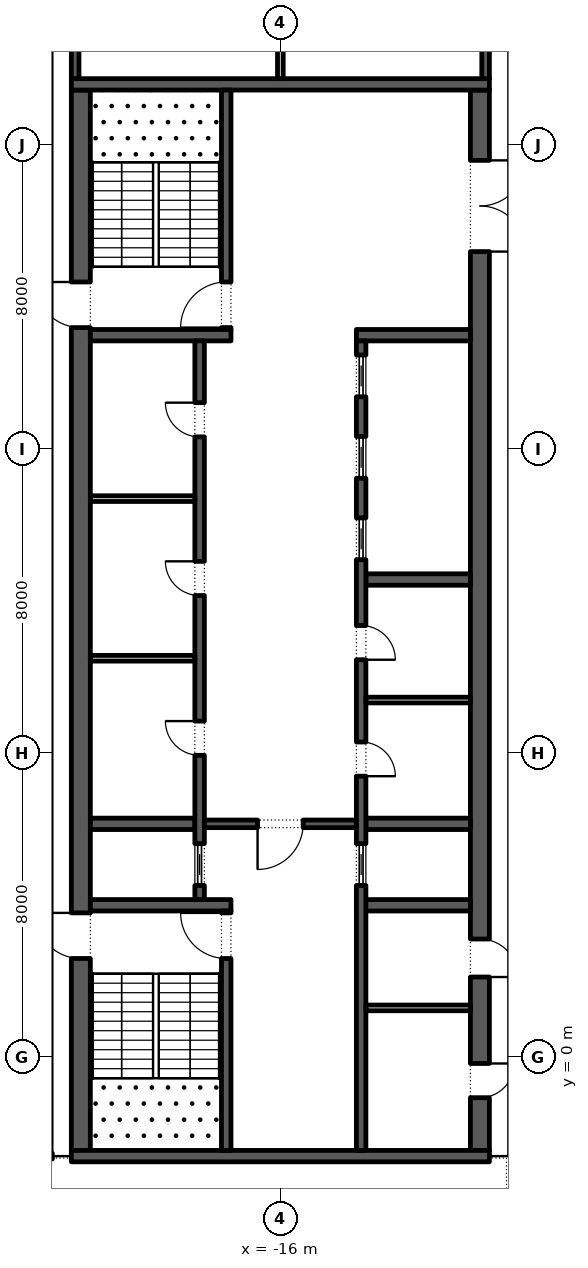
"""IFC4 building model, lengths in metres.
Left out: names, types, materials, properties, quantities, classifications, styles, units other than length and angle.
Written with IfcOpenShell. Run it as: python <this file> out.ifc"""

import sys

from ifc_helpers import new_model, si_unit, direction, frame, frame_2d, origin, place, context, subcontext, project, spatial, rectangle, extrude, element, fill, save


model = new_model("IFC4")
c1 = context("Model", 3, precision=1e-05, world=origin(), true_north=direction((0.0, 1.0)))
c2 = subcontext(c1, "Body", "Model", "MODEL_VIEW")
j1 = project(units=[si_unit("LENGTHUNIT", "METRE"), si_unit("PLANEANGLEUNIT", "RADIAN")], contexts=[c1])
p1 = place(None, origin())
s1 = spatial("IfcSite", under=j1, at=p1, CompositionType="ELEMENT")
p2 = place(p1, origin())
s2 = spatial("IfcBuilding", under=s1, at=p2, CompositionType="ELEMENT")
p3 = place(p2, frame((0.0, 0.0, 351.0)))
s3 = spatial("IfcBuildingStorey", under=s2, at=p3, CompositionType="ELEMENT", Elevation=351.0)
p4 = place(p3, frame((-21.25, -2.45, 0.0), z_axis=(0.0, 0.0, 1.0), x_axis=(0.0, 1.0, 0.0)))
e1 = element("IfcWall", 1, at=p4, inside=s3, PredefinedType="SHEAR", context=c2, shape_type="SweptSolid", body=[
    extrude(rectangle(XDim=27.9, YDim=0.5, at=frame_2d((13.95, 0.0))), origin(), (0.0, 0.0, 1.0), 4.0),
])
p5 = place(p4, frame((5.05, 0.0, 0.0)))
e2 = element("IfcOpeningElement", 2, at=p5, cuts=e1, PredefinedType="OPENING", context=c2, shape_type="SweptSolid", body=[
    extrude(rectangle(XDim=1.2, YDim=2.1, at=frame_2d((0.6, 1.05))), frame((0.0, 0.26, 0.0), z_axis=(0.0, -1.0, 0.0), x_axis=(1.0, 0.0, 0.0)), (0.0, 0.0, 1.0), 0.52),
])
p6 = place(p4, frame((21.65, 0.0, 0.0)))
e3 = element("IfcOpeningElement", 3, at=p6, cuts=e1, PredefinedType="OPENING", context=c2, shape_type="SweptSolid", body=[
    extrude(rectangle(XDim=1.2, YDim=2.1, at=frame_2d((0.6, 1.05))), frame((0.0, 0.26, 0.0), z_axis=(0.0, -1.0, 0.0), x_axis=(1.0, 0.0, 0.0)), (0.0, 0.0, 1.0), 0.52),
])
p7 = place(p3, frame((-10.75, -2.45, 0.0), z_axis=(0.0, 0.0, 1.0), x_axis=(0.0, 1.0, 0.0)))
e4 = element("IfcWall", 4, at=p7, inside=s3, PredefinedType="SHEAR", context=c2, shape_type="SweptSolid", body=[
    extrude(rectangle(XDim=27.9, YDim=0.5, at=frame_2d((13.95, 0.0))), origin(), (0.0, 0.0, 1.0), 4.0),
])
p8 = place(p7, frame((23.65, 0.0, 0.0)))
e5 = element("IfcOpeningElement", 5, at=p8, cuts=e4, PredefinedType="OPENING", context=c2, shape_type="SweptSolid", body=[
    extrude(rectangle(XDim=2.4, YDim=2.1, at=frame_2d((1.2, 1.05))), frame((0.0, 0.26, 0.0), z_axis=(0.0, -1.0, 0.0), x_axis=(1.0, 0.0, 0.0)), (0.0, 0.0, 1.0), 0.52),
])
p9 = place(p7, frame((1.387, 0.0, 0.0)))
e6 = element("IfcOpeningElement", 6, at=p9, cuts=e4, PredefinedType="OPENING", context=c2, shape_type="SweptSolid", body=[
    extrude(rectangle(XDim=0.9, YDim=2.1, at=frame_2d((0.45, 1.05))), frame((0.0, 0.26, 0.0), z_axis=(0.0, -1.0, 0.0), x_axis=(1.0, 0.0, 0.0)), (0.0, 0.0, 1.0), 0.52),
])
p10 = place(p7, frame((4.562, 0.0, 0.0)))
e7 = element("IfcOpeningElement", 7, at=p10, cuts=e4, PredefinedType="OPENING", context=c2, shape_type="SweptSolid", body=[
    extrude(rectangle(XDim=1.0, YDim=2.1, at=frame_2d((0.5, 1.05))), frame((0.0, 0.26, 0.0), z_axis=(0.0, -1.0, 0.0), x_axis=(1.0, 0.0, 0.0)), (0.0, 0.0, 1.0), 0.52),
])
for number, where, z_axis, x_axis in (
    (8, (-21.5, -2.6, 0.0), (0.0, 0.0, 1.0), (1.0, 0.0, 0.0)),
    (9, (-21.5, 25.6, 0.0), (0.0, 0.0, 1.0), (1.0, 0.0, 0.0)),
):
    element("IfcWall", number, at=place(p3, frame(where, z_axis=z_axis, x_axis=x_axis)), inside=s3, PredefinedType="SHEAR", context=c2, shape_type="SweptSolid", body=[
        extrude(rectangle(XDim=11.0, YDim=0.3, at=frame_2d((5.5, 0.0))), origin(), (0.0, 0.0, 1.0), 4.0),
    ])
p11 = place(p3, frame((-21.0, 4.0, 0.0), z_axis=(0.0, 0.0, 1.0), x_axis=(1.0, 0.0, 0.0)))
e10 = element("IfcWall", 10, at=p11, inside=s3, PredefinedType="SHEAR", context=c2, shape_type="SweptSolid", body=[
    extrude(rectangle(XDim=3.7, YDim=0.3, at=frame_2d((1.85, 0.0))), origin(), (0.0, 0.0, 1.0), 4.0),
])
p12 = place(p3, frame((-17.425, -2.45, 0.0), z_axis=(0.0, 0.0, 1.0), x_axis=(0.0, 1.0, 0.0)))
e11 = element("IfcWall", 11, at=p12, inside=s3, PredefinedType="SHEAR", context=c2, shape_type="SweptSolid", body=[
    extrude(rectangle(XDim=6.3, YDim=0.25, at=frame_2d((3.15, 0.0))), origin(), (0.0, 0.0, 1.0), 4.0),
])
p13 = place(p12, frame((5.05, 0.0, 0.0)))
e12 = element("IfcOpeningElement", 12, at=p13, cuts=e11, PredefinedType="OPENING", context=c2, shape_type="SweptSolid", body=[
    extrude(rectangle(XDim=1.2, YDim=2.1, at=frame_2d((0.6, 1.05))), frame((0.0, 0.135, 0.0), z_axis=(0.0, -1.0, 0.0), x_axis=(1.0, 0.0, 0.0)), (0.0, 0.0, 1.0), 0.27),
])
p14 = place(p3, frame((-21.0, 19.0, 0.0), z_axis=(0.0, 0.0, 1.0), x_axis=(1.0, 0.0, 0.0)))
e13 = element("IfcWall", 13, at=p14, inside=s3, PredefinedType="SHEAR", context=c2, shape_type="SweptSolid", body=[
    extrude(rectangle(XDim=3.7, YDim=0.3, at=frame_2d((1.85, 0.0))), origin(), (0.0, 0.0, 1.0), 4.0),
])
p15 = place(p3, frame((-17.425, 19.15, 0.0), z_axis=(0.0, 0.0, 1.0), x_axis=(0.0, 1.0, 0.0)))
e14 = element("IfcWall", 14, at=p15, inside=s3, PredefinedType="SHEAR", context=c2, shape_type="SweptSolid", body=[
    extrude(rectangle(XDim=6.3, YDim=0.25, at=frame_2d((3.15, 0.0))), origin(), (0.0, 0.0, 1.0), 4.0),
])
p16 = place(p15, frame((0.05, 0.0, 0.0)))
e15 = element("IfcOpeningElement", 15, at=p16, cuts=e14, PredefinedType="OPENING", context=c2, shape_type="SweptSolid", body=[
    extrude(rectangle(XDim=1.2, YDim=2.1, at=frame_2d((0.6, 1.05))), frame((0.0, 0.135, 0.0), z_axis=(0.0, -1.0, 0.0), x_axis=(1.0, 0.0, 0.0)), (0.0, 0.0, 1.0), 0.27),
])
p17 = place(p3, frame((-21.0, 6.143, 0.0), z_axis=(0.0, 0.0, 1.0), x_axis=(1.0, 0.0, 0.0)))
e16 = element("IfcWall", 16, at=p17, inside=s3, PredefinedType="SHEAR", context=c2, shape_type="SweptSolid", body=[
    extrude(rectangle(XDim=2.75, YDim=0.3, at=frame_2d((1.375, 0.0))), origin(), (0.0, 0.0, 1.0), 4.0),
])
p18 = place(p3, frame((-18.125, 4.15, 0.0), z_axis=(0.0, 0.0, 1.0), x_axis=(0.0, 1.0, 0.0)))
e17 = element("IfcWall", 17, at=p18, inside=s3, PredefinedType="SHEAR", context=c2, shape_type="SweptSolid", body=[
    extrude(rectangle(XDim=14.7, YDim=0.25, at=frame_2d((7.35, 0.0))), origin(), (0.0, 0.0, 1.0), 4.0),
])
p19 = place(p18, frame((3.796, 0.0, 0.0)))
e18 = element("IfcOpeningElement", 18, at=p19, cuts=e17, PredefinedType="OPENING", context=c2, shape_type="SweptSolid", body=[
    extrude(rectangle(XDim=0.9, YDim=2.1, at=frame_2d((0.45, 1.05))), frame((0.0, 0.135, 0.0), z_axis=(0.0, -1.0, 0.0), x_axis=(1.0, 0.0, 0.0)), (0.0, 0.0, 1.0), 0.27),
])
p20 = place(p18, frame((8.0, 0.0, 0.0)))
e19 = element("IfcOpeningElement", 19, at=p20, cuts=e17, PredefinedType="OPENING", context=c2, shape_type="SweptSolid", body=[
    extrude(rectangle(XDim=0.9, YDim=2.1, at=frame_2d((0.45, 1.05))), frame((0.0, 0.135, 0.0), z_axis=(0.0, -1.0, 0.0), x_axis=(1.0, 0.0, 0.0)), (0.0, 0.0, 1.0), 0.27),
])
p21 = place(p18, frame((12.175, 0.0, 0.0)))
e20 = element("IfcOpeningElement", 20, at=p21, cuts=e17, PredefinedType="OPENING", context=c2, shape_type="SweptSolid", body=[
    extrude(rectangle(XDim=0.9, YDim=2.1, at=frame_2d((0.45, 1.05))), frame((0.0, 0.135, 0.0), z_axis=(0.0, -1.0, 0.0), x_axis=(1.0, 0.0, 0.0)), (0.0, 0.0, 1.0), 0.27),
])
p22 = place(p18, frame((0.371, 0.0, 0.0)))
e21 = element("IfcOpeningElement", 21, at=p22, cuts=e17, PredefinedType="OPENING", context=c2, shape_type="SweptSolid", body=[
    extrude(rectangle(XDim=1.1, YDim=2.1, at=frame_2d((0.55, 1.05))), frame((0.0, 0.135, 0.0), z_axis=(0.0, -1.0, 0.0), x_axis=(1.0, 0.0, 0.0)), (0.0, 0.0, 1.0), 0.27),
])
for number, where, z_axis, x_axis in (
    (22, (-21.0, 10.5, 0.0), (0.0, 0.0, 1.0), (1.0, 0.0, 0.0)),
    (23, (-21.0, 14.7, 0.0), (0.0, 0.0, 1.0), (1.0, 0.0, 0.0)),
):
    element("IfcWall", number, at=place(p3, frame(where, z_axis=z_axis, x_axis=x_axis)), inside=s3, PredefinedType="PARTITIONING", context=c2, shape_type="SweptSolid", body=[
        extrude(rectangle(XDim=2.75, YDim=0.15, at=frame_2d((1.375, 0.0))), origin(), (0.0, 0.0, 1.0), 4.0),
    ])
p23 = place(p3, frame((-14.0, 4.0, 0.0), z_axis=(0.0, 0.0, 1.0), x_axis=(1.0, 0.0, 0.0)))
e24 = element("IfcWall", 24, at=p23, inside=s3, PredefinedType="SHEAR", context=c2, shape_type="SweptSolid", body=[
    extrude(rectangle(XDim=3.0, YDim=0.3, at=frame_2d((1.5, 0.0))), origin(), (0.0, 0.0, 1.0), 4.0),
])
for number, where, z_axis, x_axis in (
    (25, (-13.75, 6.143, 0.0), (0.0, 0.0, 1.0), (1.0, 0.0, 0.0)),
    (26, (-13.75, 12.571, 0.0), (0.0, 0.0, 1.0), (1.0, 0.0, 0.0)),
):
    element("IfcWall", number, at=place(p3, frame(where, z_axis=z_axis, x_axis=x_axis)), inside=s3, PredefinedType="SHEAR", context=c2, shape_type="SweptSolid", body=[
        extrude(rectangle(XDim=2.75, YDim=0.3, at=frame_2d((1.375, 0.0))), origin(), (0.0, 0.0, 1.0), 4.0),
    ])
p24 = place(p3, frame((-14.0, 19.0, 0.0), z_axis=(0.0, 0.0, 1.0), x_axis=(1.0, 0.0, 0.0)))
e27 = element("IfcWall", 27, at=p24, inside=s3, PredefinedType="SHEAR", context=c2, shape_type="SweptSolid", body=[
    extrude(rectangle(XDim=3.0, YDim=0.3, at=frame_2d((1.5, 0.0))), origin(), (0.0, 0.0, 1.0), 4.0),
])
p25 = place(p3, frame((-13.875, -2.45, 0.0), z_axis=(0.0, 0.0, 1.0), x_axis=(0.0, 1.0, 0.0)))
e28 = element("IfcWall", 28, at=p25, inside=s3, PredefinedType="SHEAR", context=c2, shape_type="SweptSolid", body=[
    extrude(rectangle(XDim=21.3, YDim=0.25, at=frame_2d((10.65, 0.0))), origin(), (0.0, 0.0, 1.0), 4.0),
])
p26 = place(p25, frame((9.846, 0.0, 0.0)))
e29 = element("IfcOpeningElement", 29, at=p26, cuts=e28, PredefinedType="OPENING", context=c2, shape_type="SweptSolid", body=[
    extrude(rectangle(XDim=0.9, YDim=2.1, at=frame_2d((0.45, 1.05))), frame((0.0, 0.135, 0.0), z_axis=(0.0, -1.0, 0.0), x_axis=(1.0, 0.0, 0.0)), (0.0, 0.0, 1.0), 0.27),
])
p27 = place(p25, frame((12.911, 0.0, 0.0)))
e30 = element("IfcOpeningElement", 30, at=p27, cuts=e28, PredefinedType="OPENING", context=c2, shape_type="SweptSolid", body=[
    extrude(rectangle(XDim=0.9, YDim=2.1, at=frame_2d((0.45, 1.05))), frame((0.0, 0.135, 0.0), z_axis=(0.0, -1.0, 0.0), x_axis=(1.0, 0.0, 0.0)), (0.0, 0.0, 1.0), 0.27),
])
p28 = place(p25, frame((6.971, 0.0, 0.0)))
e31 = element("IfcOpeningElement", 31, at=p28, cuts=e28, PredefinedType="OPENING", context=c2, shape_type="SweptSolid", body=[
    extrude(rectangle(XDim=1.1, YDim=2.1, at=frame_2d((0.55, 1.05))), frame((0.0, 0.135, 0.0), z_axis=(0.0, -1.0, 0.0), x_axis=(1.0, 0.0, 0.0)), (0.0, 0.0, 1.0), 0.27),
])
p29 = place(p25, frame((15.543, 0.0, 0.0)))
e32 = element("IfcOpeningElement", 32, at=p29, cuts=e28, PredefinedType="OPENING", context=c2, shape_type="SweptSolid", body=[
    extrude(rectangle(XDim=1.1, YDim=2.1, at=frame_2d((0.55, 1.05))), frame((0.0, 0.135, 0.0), z_axis=(0.0, -1.0, 0.0), x_axis=(1.0, 0.0, 0.0)), (0.0, 0.0, 1.0), 0.27),
])
p30 = place(p25, frame((17.686, 0.0, 0.0)))
e33 = element("IfcOpeningElement", 33, at=p30, cuts=e28, PredefinedType="OPENING", context=c2, shape_type="SweptSolid", body=[
    extrude(rectangle(XDim=1.1, YDim=2.1, at=frame_2d((0.55, 1.05))), frame((0.0, 0.135, 0.0), z_axis=(0.0, -1.0, 0.0), x_axis=(1.0, 0.0, 0.0)), (0.0, 0.0, 1.0), 0.27),
])
p31 = place(p25, frame((19.829, 0.0, 0.0)))
e34 = element("IfcOpeningElement", 34, at=p31, cuts=e28, PredefinedType="OPENING", context=c2, shape_type="SweptSolid", body=[
    extrude(rectangle(XDim=1.1, YDim=2.1, at=frame_2d((0.55, 1.05))), frame((0.0, 0.135, 0.0), z_axis=(0.0, -1.0, 0.0), x_axis=(1.0, 0.0, 0.0)), (0.0, 0.0, 1.0), 0.27),
])
p32 = place(p3, frame((-13.75, 9.4, 0.0), z_axis=(0.0, 0.0, 1.0), x_axis=(1.0, 0.0, 0.0)))
e35 = element("IfcWall", 35, at=p32, inside=s3, PredefinedType="PARTITIONING", context=c2, shape_type="SweptSolid", body=[
    extrude(rectangle(XDim=2.75, YDim=0.15, at=frame_2d((1.375, 0.0))), origin(), (0.0, 0.0, 1.0), 4.0),
])
p33 = place(p3, frame((-18.0, 6.143, 0.0), z_axis=(0.0, 0.0, 1.0), x_axis=(1.0, 0.0, 0.0)))
e36 = element("IfcWall", 36, at=p33, inside=s3, PredefinedType="SHEAR", context=c2, shape_type="SweptSolid", body=[
    extrude(rectangle(XDim=4.0, YDim=0.2, at=frame_2d((2.0, 0.0))), origin(), (0.0, 0.0, 1.0), 4.0),
])
p34 = place(p33, frame((1.4, 0.0, 0.0)))
e37 = element("IfcOpeningElement", 37, at=p34, cuts=e36, PredefinedType="OPENING", context=c2, shape_type="SweptSolid", body=[
    extrude(rectangle(XDim=1.2, YDim=2.1, at=frame_2d((0.6, 1.05))), frame((0.0, 0.11, 0.0), z_axis=(0.0, -1.0, 0.0), x_axis=(1.0, 0.0, 0.0)), (0.0, 0.0, 1.0), 0.22),
])
p35 = place(p3, frame((-13.75, 1.3, 0.0), z_axis=(0.0, 0.0, 1.0), x_axis=(1.0, 0.0, 0.0)))
e38 = element("IfcWall", 38, at=p35, inside=s3, PredefinedType="PARTITIONING", context=c2, shape_type="SweptSolid", body=[
    extrude(rectangle(XDim=2.75, YDim=0.15, at=frame_2d((1.375, 0.0))), origin(), (0.0, 0.0, 1.0), 4.0),
])
p36 = place(p3, frame((-21.4, 25.75, 0.0), z_axis=(0.0, 0.0, 1.0), x_axis=(0.0, 1.0, 0.0)))
e39 = element("IfcWall", 39, at=p36, inside=s3, PredefinedType="SHEAR", context=c2, shape_type="SweptSolid", body=[
    extrude(rectangle(XDim=15.05, YDim=0.2, at=frame_2d((7.525, 0.0))), origin(), (0.0, 0.0, 1.0), 4.0),
])
p37 = place(p36, frame((7.075, 0.0, 0.0)))
e40 = element("IfcOpeningElement", 40, at=p37, cuts=e39, PredefinedType="OPENING", context=c2, shape_type="SweptSolid", body=[
    extrude(rectangle(XDim=0.9, YDim=2.1, at=frame_2d((0.45, 1.05))), frame((0.0, 0.11, 0.0), z_axis=(0.0, -1.0, 0.0), x_axis=(1.0, 0.0, 0.0)), (0.0, 0.0, 1.0), 0.22),
])
p38 = place(p3, frame((-10.6, 25.75, 0.0), z_axis=(0.0, 0.0, 1.0), x_axis=(0.0, 1.0, 0.0)))
e41 = element("IfcWall", 41, at=p38, inside=s3, PredefinedType="SHEAR", context=c2, shape_type="SweptSolid", body=[
    extrude(rectangle(XDim=15.05, YDim=0.2, at=frame_2d((7.525, 0.0))), origin(), (0.0, 0.0, 1.0), 4.0),
])
p39 = place(p38, frame((7.075, 0.0, 0.0)))
e42 = element("IfcOpeningElement", 42, at=p39, cuts=e41, PredefinedType="OPENING", context=c2, shape_type="SweptSolid", body=[
    extrude(rectangle(XDim=0.9, YDim=2.1, at=frame_2d((0.45, 1.05))), frame((0.0, 0.11, 0.0), z_axis=(0.0, -1.0, 0.0), x_axis=(1.0, 0.0, 0.0)), (0.0, 0.0, 1.0), 0.22),
])
p40 = place(p3, frame((-16.0, 25.75, 0.0), z_axis=(0.0, 0.0, 1.0), x_axis=(0.0, 1.0, 0.0)))
e43 = element("IfcWall", 43, at=p40, inside=s3, PredefinedType="PARTITIONING", context=c2, shape_type="SweptSolid", body=[
    extrude(rectangle(XDim=15.05, YDim=0.15, at=frame_2d((7.525, 0.0))), origin(), (0.0, 0.0, 1.0), 4.0),
])
p41 = place(p19, origin())
e44 = element("IfcDoor", 44, at=p41, inside=s3, OperationType="SINGLE_SWING_LEFT", PredefinedType="DOOR", context=c2, shape_type="SweptSolid", body=[
    extrude(rectangle(XDim=0.9, YDim=2.1, at=frame_2d((0.45, 1.05))), frame((0.0, 0.125, 0.0), z_axis=(0.0, -1.0, 0.0), x_axis=(1.0, 0.0, 0.0)), (0.0, 0.0, 1.0), 0.05),
])
fill(e18, e44)
p42 = place(p20, origin())
e45 = element("IfcDoor", 45, at=p42, inside=s3, OperationType="SINGLE_SWING_LEFT", PredefinedType="DOOR", context=c2, shape_type="SweptSolid", body=[
    extrude(rectangle(XDim=0.9, YDim=2.1, at=frame_2d((0.45, 1.05))), frame((0.0, 0.125, 0.0), z_axis=(0.0, -1.0, 0.0), x_axis=(1.0, 0.0, 0.0)), (0.0, 0.0, 1.0), 0.05),
])
fill(e19, e45)
p43 = place(p21, origin())
e46 = element("IfcDoor", 46, at=p43, inside=s3, OperationType="SINGLE_SWING_LEFT", PredefinedType="DOOR", context=c2, shape_type="SweptSolid", body=[
    extrude(rectangle(XDim=0.9, YDim=2.1, at=frame_2d((0.45, 1.05))), frame((0.0, 0.125, 0.0), z_axis=(0.0, -1.0, 0.0), x_axis=(1.0, 0.0, 0.0)), (0.0, 0.0, 1.0), 0.05),
])
fill(e20, e46)
p44 = place(p22, origin())
e47 = element("IfcDoor", 47, at=p44, inside=s3, OperationType="SLIDING_TO_LEFT", PredefinedType="DOOR", context=c2, shape_type="SweptSolid", body=[
    extrude(rectangle(XDim=1.1, YDim=2.1, at=frame_2d((0.55, 1.05))), frame((0.0, 0.025, 0.0), z_axis=(0.0, -1.0, 0.0), x_axis=(1.0, 0.0, 0.0)), (0.0, 0.0, 1.0), 0.05),
])
fill(e21, e47)
p45 = place(p26, frame((0.9, -0.2, 0.0), z_axis=(0.0, 0.0, 1.0), x_axis=(-1.0, 0.0, 0.0)))
e48 = element("IfcDoor", 48, at=p45, inside=s3, OperationType="SINGLE_SWING_LEFT", PredefinedType="DOOR", context=c2, shape_type="SweptSolid", body=[
    extrude(rectangle(XDim=0.9, YDim=2.1, at=frame_2d((0.45, 1.05))), frame((0.0, -0.075, 0.0), z_axis=(0.0, -1.0, 0.0), x_axis=(1.0, 0.0, 0.0)), (0.0, 0.0, 1.0), 0.05),
])
fill(e29, e48)
p46 = place(p27, frame((0.9, -0.2, 0.0), z_axis=(0.0, 0.0, 1.0), x_axis=(-1.0, 0.0, 0.0)))
e49 = element("IfcDoor", 49, at=p46, inside=s3, OperationType="SINGLE_SWING_LEFT", PredefinedType="DOOR", context=c2, shape_type="SweptSolid", body=[
    extrude(rectangle(XDim=0.9, YDim=2.1, at=frame_2d((0.45, 1.05))), frame((0.0, -0.075, 0.0), z_axis=(0.0, -1.0, 0.0), x_axis=(1.0, 0.0, 0.0)), (0.0, 0.0, 1.0), 0.05),
])
fill(e30, e49)
p47 = place(p28, origin())
e50 = element("IfcDoor", 50, at=p47, inside=s3, OperationType="SLIDING_TO_LEFT", PredefinedType="DOOR", context=c2, shape_type="SweptSolid", body=[
    extrude(rectangle(XDim=1.1, YDim=2.1, at=frame_2d((0.55, 1.05))), frame((0.0, 0.025, 0.0), z_axis=(0.0, -1.0, 0.0), x_axis=(1.0, 0.0, 0.0)), (0.0, 0.0, 1.0), 0.05),
])
fill(e31, e50)
p48 = place(p29, origin())
e51 = element("IfcDoor", 51, at=p48, inside=s3, OperationType="SLIDING_TO_LEFT", PredefinedType="DOOR", context=c2, shape_type="SweptSolid", body=[
    extrude(rectangle(XDim=1.1, YDim=2.1, at=frame_2d((0.55, 1.05))), frame((0.0, 0.025, 0.0), z_axis=(0.0, -1.0, 0.0), x_axis=(1.0, 0.0, 0.0)), (0.0, 0.0, 1.0), 0.05),
])
fill(e32, e51)
p49 = place(p30, origin())
e52 = element("IfcDoor", 52, at=p49, inside=s3, OperationType="SLIDING_TO_LEFT", PredefinedType="DOOR", context=c2, shape_type="SweptSolid", body=[
    extrude(rectangle(XDim=1.1, YDim=2.1, at=frame_2d((0.55, 1.05))), frame((0.0, 0.025, 0.0), z_axis=(0.0, -1.0, 0.0), x_axis=(1.0, 0.0, 0.0)), (0.0, 0.0, 1.0), 0.05),
])
fill(e33, e52)
p50 = place(p31, origin())
e53 = element("IfcDoor", 53, at=p50, inside=s3, OperationType="SLIDING_TO_LEFT", PredefinedType="DOOR", context=c2, shape_type="SweptSolid", body=[
    extrude(rectangle(XDim=1.1, YDim=2.1, at=frame_2d((0.55, 1.05))), frame((0.0, 0.025, 0.0), z_axis=(0.0, -1.0, 0.0), x_axis=(1.0, 0.0, 0.0)), (0.0, 0.0, 1.0), 0.05),
])
fill(e34, e53)
p51 = place(p34, frame((1.2, 0.0, 0.0), z_axis=(0.0, 0.0, 1.0), x_axis=(-1.0, 0.0, 0.0)))
e54 = element("IfcDoor", 54, at=p51, inside=s3, OperationType="SINGLE_SWING_LEFT", PredefinedType="DOOR", context=c2, shape_type="SweptSolid", body=[
    extrude(rectangle(XDim=1.2, YDim=2.1, at=frame_2d((0.6, 1.05))), frame((0.0, 0.025, 0.0), z_axis=(0.0, -1.0, 0.0), x_axis=(1.0, 0.0, 0.0)), (0.0, 0.0, 1.0), 0.05),
])
fill(e37, e54)
p52 = place(p8, frame((2.4, 0.0, 0.0), z_axis=(0.0, 0.0, 1.0), x_axis=(-1.0, 0.0, 0.0)))
e55 = element("IfcDoor", 55, at=p52, inside=s3, OperationType="DOUBLE_DOOR_SINGLE_SWING", PredefinedType="DOOR", context=c2, shape_type="SweptSolid", body=[
    extrude(rectangle(XDim=2.4, YDim=2.1, at=frame_2d((1.2, 1.05))), frame((0.0, 0.025, 0.0), z_axis=(0.0, -1.0, 0.0), x_axis=(1.0, 0.0, 0.0)), (0.0, 0.0, 1.0), 0.05),
])
fill(e5, e55)
p53 = place(p13, origin())
e56 = element("IfcDoor", 56, at=p53, inside=s3, OperationType="SINGLE_SWING_LEFT", PredefinedType="DOOR", context=c2, shape_type="SweptSolid", body=[
    extrude(rectangle(XDim=1.2, YDim=2.1, at=frame_2d((0.6, 1.05))), frame((0.0, 0.025, 0.0), z_axis=(0.0, -1.0, 0.0), x_axis=(1.0, 0.0, 0.0)), (0.0, 0.0, 1.0), 0.05),
])
fill(e12, e56)
p54 = place(p5, origin())
e57 = element("IfcDoor", 57, at=p54, inside=s3, OperationType="SINGLE_SWING_LEFT", PredefinedType="DOOR", context=c2, shape_type="SweptSolid", body=[
    extrude(rectangle(XDim=1.2, YDim=2.1, at=frame_2d((0.6, 1.05))), frame((0.0, 0.025, 0.0), z_axis=(0.0, -1.0, 0.0), x_axis=(1.0, 0.0, 0.0)), (0.0, 0.0, 1.0), 0.05),
])
fill(e2, e57)
p55 = place(p16, origin())
e58 = element("IfcDoor", 58, at=p55, inside=s3, OperationType="SINGLE_SWING_RIGHT", PredefinedType="DOOR", context=c2, shape_type="SweptSolid", body=[
    extrude(rectangle(XDim=1.2, YDim=2.1, at=frame_2d((0.6, 1.05))), frame((0.0, 0.025, 0.0), z_axis=(0.0, -1.0, 0.0), x_axis=(1.0, 0.0, 0.0)), (0.0, 0.0, 1.0), 0.05),
])
fill(e15, e58)
p56 = place(p6, origin())
e59 = element("IfcDoor", 59, at=p56, inside=s3, OperationType="SINGLE_SWING_LEFT", PredefinedType="DOOR", context=c2, shape_type="SweptSolid", body=[
    extrude(rectangle(XDim=1.2, YDim=2.1, at=frame_2d((0.6, 1.05))), frame((0.0, 0.025, 0.0), z_axis=(0.0, -1.0, 0.0), x_axis=(1.0, 0.0, 0.0)), (0.0, 0.0, 1.0), 0.05),
])
fill(e3, e59)
p57 = place(p9, frame((0.9, 0.45, 0.0), z_axis=(0.0, 0.0, 1.0), x_axis=(-1.0, 0.0, 0.0)))
e60 = element("IfcDoor", 60, at=p57, inside=s3, OperationType="SINGLE_SWING_RIGHT", PredefinedType="DOOR", context=c2, shape_type="SweptSolid", body=[
    extrude(rectangle(XDim=0.9, YDim=2.1, at=frame_2d((0.45, 1.05))), frame((0.0, 0.25, 0.0), z_axis=(0.0, -1.0, 0.0), x_axis=(1.0, 0.0, 0.0)), (0.0, 0.0, 1.0), 0.05),
])
fill(e6, e60)
p58 = place(p10, frame((1.0, 0.45, 0.0), z_axis=(0.0, 0.0, 1.0), x_axis=(-1.0, 0.0, 0.0)))
e61 = element("IfcDoor", 61, at=p58, inside=s3, OperationType="SINGLE_SWING_LEFT", PredefinedType="DOOR", context=c2, shape_type="SweptSolid", body=[
    extrude(rectangle(XDim=1.0, YDim=2.1, at=frame_2d((0.5, 1.05))), frame((0.0, 0.25, 0.0), z_axis=(0.0, -1.0, 0.0), x_axis=(1.0, 0.0, 0.0)), (0.0, 0.0, 1.0), 0.05),
])
fill(e7, e61)
save(model, sys.argv[1])
